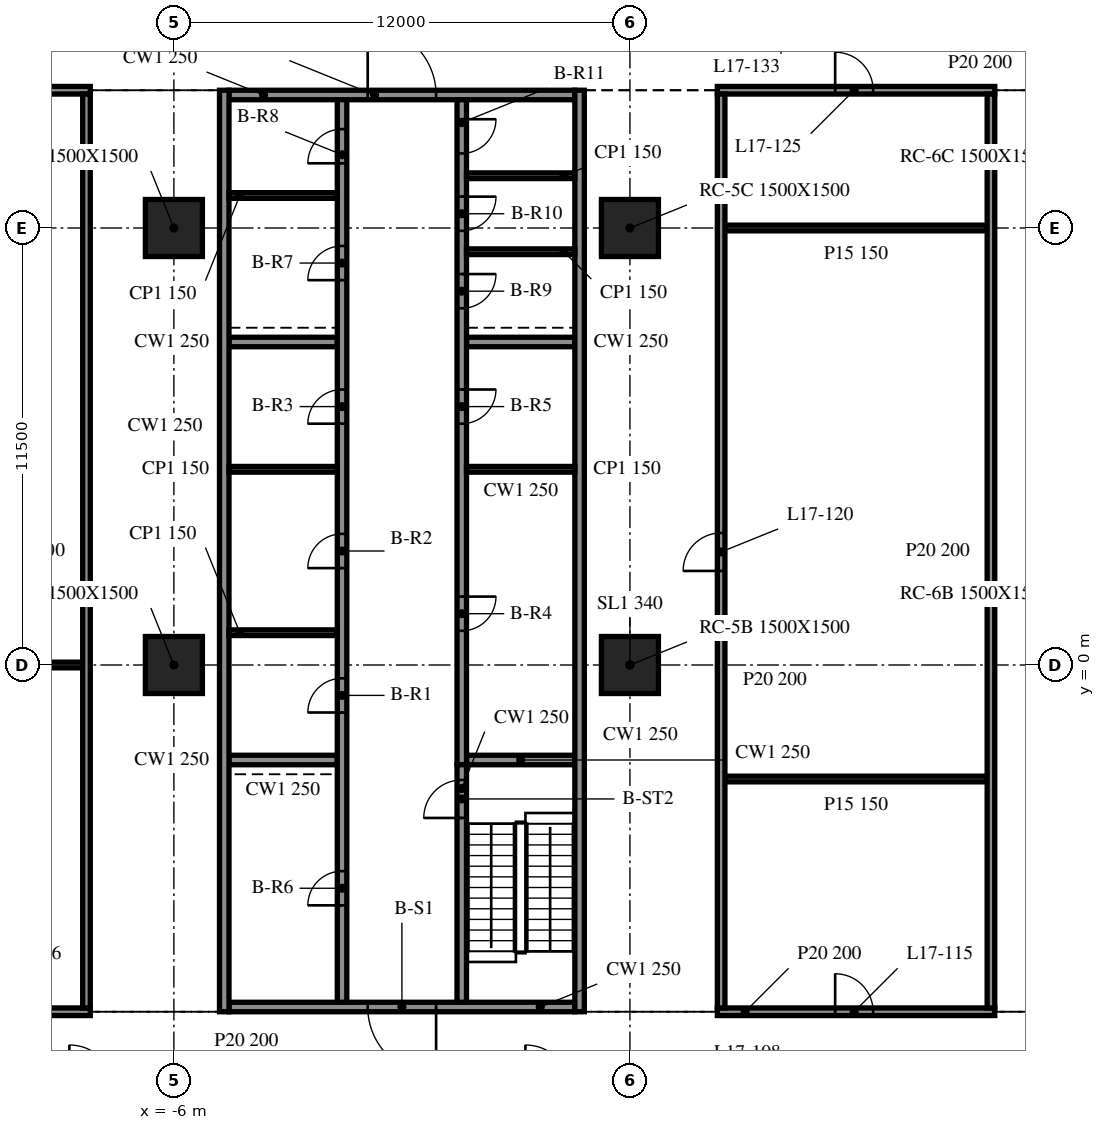
"""IFC4 building model, lengths in metres.
Left out: names, types, materials, properties, quantities, classifications, styles, units other than length and angle.
Written with IfcOpenShell. Run it as: python <this file> out.ifc"""

import sys

from ifc_helpers import new_model, si_unit, direction, frame, frame_2d, origin, origin_2d, place, context, subcontext, project, spatial, rectangle, extrude, element, fill, save


model = new_model("IFC4")
c1 = context("Model", 3, precision=1e-05, world=origin(), true_north=direction((0.0, 1.0)))
c2 = subcontext(c1, "Body", "Model", "MODEL_VIEW")
j1 = project(units=[si_unit("LENGTHUNIT", "METRE"), si_unit("PLANEANGLEUNIT", "RADIAN")], contexts=[c1])
p1 = place(None, origin())
s1 = spatial("IfcSite", under=j1, at=p1, CompositionType="ELEMENT")
p2 = place(p1, origin())
s2 = spatial("IfcBuilding", under=s1, at=p2, CompositionType="ELEMENT")
p3 = place(p2, frame((0.0, 0.0, 76.1)))
s3 = spatial("IfcBuildingStorey", under=s2, at=p3, CompositionType="ELEMENT", Elevation=76.1)
for number, where, z_axis, x_axis in (
    (1, (-6.0, 0.0, -0.34), (0.0, 0.0, 1.0), (1.0, 0.0, 0.0)),
    (2, (-6.0, 11.5, -0.34), (0.0, 0.0, 1.0), (1.0, 0.0, 0.0)),
    (3, (6.0, 0.0, -0.34), (0.0, 0.0, 1.0), (1.0, 0.0, 0.0)),
    (4, (6.0, 11.5, -0.34), (0.0, 0.0, 1.0), (1.0, 0.0, 0.0)),
):
    element("IfcColumn", number, at=place(p3, frame(where, z_axis=z_axis, x_axis=x_axis)), inside=s3, PredefinedType="COLUMN", context=c2, shape_type="SweptSolid", body=[
        extrude(rectangle(XDim=1.5, YDim=1.5, at=origin_2d()), origin(), (0.0, 0.0, 1.0), 4.09),
    ])
for number, where, z_axis, x_axis in (
    (5, (-4.675, 15.125, 0.0), (0.0, 0.0, 1.0), (0.0, -1.0, 0.0)),
    (6, (4.675, -9.125, 0.0), (0.0, 0.0, 1.0), (0.0, 1.0, 0.0)),
):
    element("IfcWall", number, at=place(p3, frame(where, z_axis=z_axis, x_axis=x_axis)), inside=s3, PredefinedType="SOLIDWALL", context=c2, shape_type="SweptSolid", body=[
        extrude(rectangle(XDim=24.25, YDim=0.25, at=frame_2d((12.125, 0.0))), origin(), (0.0, 0.0, 1.0), 3.75),
    ])
p4 = place(p3, frame((4.55, -9.0, 0.0), z_axis=(0.0, 0.0, 1.0), x_axis=(-1.0, 0.0, 0.0)))
e7 = element("IfcWall", 7, at=p4, inside=s3, PredefinedType="SOLIDWALL", context=c2, shape_type="SweptSolid", body=[
    extrude(rectangle(XDim=9.1, YDim=0.25, at=frame_2d((4.55, 0.0))), origin(), (0.0, 0.0, 1.0), 3.75),
])
p5 = place(p4, frame((3.65, 0.0, 0.0)))
e8 = element("IfcOpeningElement", 8, at=p5, cuts=e7, PredefinedType="OPENING", context=c2, shape_type="SweptSolid", body=[
    extrude(rectangle(XDim=1.8, YDim=2.1, at=frame_2d((0.9, 1.05))), frame((0.0, 0.135, 0.0), z_axis=(0.0, -1.0, 0.0), x_axis=(1.0, 0.0, 0.0)), (0.0, 0.0, 1.0), 0.27),
])
p6 = place(p3, frame((-4.55, 15.0, 0.0), z_axis=(0.0, 0.0, 1.0), x_axis=(1.0, 0.0, 0.0)))
e9 = element("IfcWall", 9, at=p6, inside=s3, PredefinedType="SOLIDWALL", context=c2, shape_type="SweptSolid", body=[
    extrude(rectangle(XDim=9.1, YDim=0.25, at=frame_2d((4.55, 0.0))), origin(), (0.0, 0.0, 1.0), 3.75),
])
p7 = place(p6, frame((3.65, 0.0, 0.0)))
e10 = element("IfcOpeningElement", 10, at=p7, cuts=e9, PredefinedType="OPENING", context=c2, shape_type="SweptSolid", body=[
    extrude(rectangle(XDim=1.8, YDim=2.1, at=frame_2d((0.9, 1.05))), frame((0.0, 0.135, 0.0), z_axis=(0.0, -1.0, 0.0), x_axis=(1.0, 0.0, 0.0)), (0.0, 0.0, 1.0), 0.27),
])
p8 = place(p3, frame((-1.575, -8.875, 0.0), z_axis=(0.0, 0.0, 1.0), x_axis=(0.0, 1.0, 0.0)))
e11 = element("IfcWall", 11, at=p8, inside=s3, PredefinedType="SOLIDWALL", context=c2, shape_type="SweptSolid", body=[
    extrude(rectangle(XDim=23.75, YDim=0.25, at=frame_2d((11.875, 0.0))), origin(), (0.0, 0.0, 1.0), 3.75),
])
p9 = place(p8, frame((7.625, 0.0, 0.0)))
e12 = element("IfcOpeningElement", 12, at=p9, cuts=e11, PredefinedType="OPENING", context=c2, shape_type="SweptSolid", body=[
    extrude(rectangle(XDim=0.9, YDim=2.1, at=frame_2d((0.45, 1.05))), frame((0.0, 0.135, 0.0), z_axis=(0.0, -1.0, 0.0), x_axis=(1.0, 0.0, 0.0)), (0.0, 0.0, 1.0), 0.27),
])
p10 = place(p8, frame((11.425, 0.0, 0.0)))
e13 = element("IfcOpeningElement", 13, at=p10, cuts=e11, PredefinedType="OPENING", context=c2, shape_type="SweptSolid", body=[
    extrude(rectangle(XDim=0.9, YDim=2.1, at=frame_2d((0.45, 1.05))), frame((0.0, 0.135, 0.0), z_axis=(0.0, -1.0, 0.0), x_axis=(1.0, 0.0, 0.0)), (0.0, 0.0, 1.0), 0.27),
])
p11 = place(p8, frame((15.225, 0.0, 0.0)))
e14 = element("IfcOpeningElement", 14, at=p11, cuts=e11, PredefinedType="OPENING", context=c2, shape_type="SweptSolid", body=[
    extrude(rectangle(XDim=0.9, YDim=2.1, at=frame_2d((0.45, 1.05))), frame((0.0, 0.135, 0.0), z_axis=(0.0, -1.0, 0.0), x_axis=(1.0, 0.0, 0.0)), (0.0, 0.0, 1.0), 0.27),
])
p12 = place(p8, frame((2.55, 0.0, 0.0)))
e15 = element("IfcOpeningElement", 15, at=p12, cuts=e11, PredefinedType="OPENING", context=c2, shape_type="SweptSolid", body=[
    extrude(rectangle(XDim=0.9, YDim=2.1, at=frame_2d((0.45, 1.05))), frame((0.0, 0.135, 0.0), z_axis=(0.0, -1.0, 0.0), x_axis=(1.0, 0.0, 0.0)), (0.0, 0.0, 1.0), 0.27),
])
p13 = place(p8, frame((19.002, 0.0, 0.0)))
e16 = element("IfcOpeningElement", 16, at=p13, cuts=e11, PredefinedType="OPENING", context=c2, shape_type="SweptSolid", body=[
    extrude(rectangle(XDim=0.9, YDim=2.1, at=frame_2d((0.45, 1.05))), frame((0.0, 0.135, 0.0), z_axis=(0.0, -1.0, 0.0), x_axis=(1.0, 0.0, 0.0)), (0.0, 0.0, 1.0), 0.27),
])
p14 = place(p8, frame((22.077, 0.0, 0.0)))
e17 = element("IfcOpeningElement", 17, at=p14, cuts=e11, PredefinedType="OPENING", context=c2, shape_type="SweptSolid", body=[
    extrude(rectangle(XDim=0.9, YDim=2.1, at=frame_2d((0.45, 1.05))), frame((0.0, 0.135, 0.0), z_axis=(0.0, -1.0, 0.0), x_axis=(1.0, 0.0, 0.0)), (0.0, 0.0, 1.0), 0.27),
])
p15 = place(p3, frame((1.575, -8.875, 0.0), z_axis=(0.0, 0.0, 1.0), x_axis=(0.0, 1.0, 0.0)))
e18 = element("IfcWall", 18, at=p15, inside=s3, PredefinedType="SOLIDWALL", context=c2, shape_type="SweptSolid", body=[
    extrude(rectangle(XDim=6.25, YDim=0.25, at=frame_2d((3.125, 0.0))), origin(), (0.0, 0.0, 1.0), 3.75),
])
p16 = place(p15, frame((4.85, 0.0, 0.0)))
e19 = element("IfcOpeningElement", 19, at=p16, cuts=e18, PredefinedType="OPENING", context=c2, shape_type="SweptSolid", body=[
    extrude(rectangle(XDim=1.0, YDim=2.1, at=frame_2d((0.5, 1.05))), frame((0.0, 0.135, 0.0), z_axis=(0.0, -1.0, 0.0), x_axis=(1.0, 0.0, 0.0)), (0.0, 0.0, 1.0), 0.27),
])
p17 = place(p3, frame((1.575, 14.875, 0.0), z_axis=(0.0, 0.0, 1.0), x_axis=(0.0, -1.0, 0.0)))
e20 = element("IfcWall", 20, at=p17, inside=s3, PredefinedType="SOLIDWALL", context=c2, shape_type="SweptSolid", body=[
    extrude(rectangle(XDim=17.5, YDim=0.25, at=frame_2d((8.75, 0.0))), origin(), (0.0, 0.0, 1.0), 3.75),
])
p18 = place(p17, frame((13.075, 0.0, 0.0)))
e21 = element("IfcOpeningElement", 21, at=p18, cuts=e20, PredefinedType="OPENING", context=c2, shape_type="SweptSolid", body=[
    extrude(rectangle(XDim=0.9, YDim=2.1, at=frame_2d((0.45, 1.05))), frame((0.0, 0.135, 0.0), z_axis=(0.0, -1.0, 0.0), x_axis=(1.0, 0.0, 0.0)), (0.0, 0.0, 1.0), 0.27),
])
p19 = place(p17, frame((7.625, 0.0, 0.0)))
e22 = element("IfcOpeningElement", 22, at=p19, cuts=e20, PredefinedType="OPENING", context=c2, shape_type="SweptSolid", body=[
    extrude(rectangle(XDim=0.9, YDim=2.1, at=frame_2d((0.45, 1.05))), frame((0.0, 0.135, 0.0), z_axis=(0.0, -1.0, 0.0), x_axis=(1.0, 0.0, 0.0)), (0.0, 0.0, 1.0), 0.27),
])
p20 = place(p17, frame((4.587, 0.0, 0.0)))
e23 = element("IfcOpeningElement", 23, at=p20, cuts=e20, PredefinedType="OPENING", context=c2, shape_type="SweptSolid", body=[
    extrude(rectangle(XDim=0.9, YDim=2.1, at=frame_2d((0.45, 1.05))), frame((0.0, 0.135, 0.0), z_axis=(0.0, -1.0, 0.0), x_axis=(1.0, 0.0, 0.0)), (0.0, 0.0, 1.0), 0.27),
])
p21 = place(p17, frame((2.55, 0.0, 0.0)))
e24 = element("IfcOpeningElement", 24, at=p21, cuts=e20, PredefinedType="OPENING", context=c2, shape_type="SweptSolid", body=[
    extrude(rectangle(XDim=0.9, YDim=2.1, at=frame_2d((0.45, 1.05))), frame((0.0, 0.135, 0.0), z_axis=(0.0, -1.0, 0.0), x_axis=(1.0, 0.0, 0.0)), (0.0, 0.0, 1.0), 0.27),
])
p22 = place(p17, frame((0.512, 0.0, 0.0)))
e25 = element("IfcOpeningElement", 25, at=p22, cuts=e20, PredefinedType="OPENING", context=c2, shape_type="SweptSolid", body=[
    extrude(rectangle(XDim=0.9, YDim=2.1, at=frame_2d((0.45, 1.05))), frame((0.0, 0.135, 0.0), z_axis=(0.0, -1.0, 0.0), x_axis=(1.0, 0.0, 0.0)), (0.0, 0.0, 1.0), 0.27),
])
for number, where, z_axis, x_axis in (
    (26, (-4.55, -2.5, 0.0), (0.0, 0.0, 1.0), (1.0, 0.0, 0.0)),
    (27, (-4.55, 8.5, 0.0), (0.0, 0.0, 1.0), (1.0, 0.0, 0.0)),
    (28, (1.7, -2.5, 0.0), (0.0, 0.0, 1.0), (1.0, 0.0, 0.0)),
    (29, (1.7, 8.5, 0.0), (0.0, 0.0, 1.0), (1.0, 0.0, 0.0)),
):
    element("IfcWall", number, at=place(p3, frame(where, z_axis=z_axis, x_axis=x_axis)), inside=s3, PredefinedType="SOLIDWALL", context=c2, shape_type="SweptSolid", body=[
        extrude(rectangle(XDim=2.85, YDim=0.25, at=frame_2d((1.425, 0.0))), origin(), (0.0, 0.0, 1.0), 3.75),
    ])
for number, where, z_axis, x_axis in (
    (30, (-4.55, 0.85, 0.0), (0.0, 0.0, 1.0), (1.0, 0.0, 0.0)),
    (31, (-4.55, 5.15, 0.0), (0.0, 0.0, 1.0), (1.0, 0.0, 0.0)),
    (32, (1.7, 5.15, 0.0), (0.0, 0.0, 1.0), (1.0, 0.0, 0.0)),
    (33, (-4.55, 12.355, 0.0), (0.0, 0.0, 1.0), (1.0, 0.0, 0.0)),
    (34, (1.7, 10.875, 0.0), (0.0, 0.0, 1.0), (1.0, 0.0, 0.0)),
    (35, (1.7, 12.875, 0.0), (0.0, 0.0, 1.0), (1.0, 0.0, 0.0)),
):
    element("IfcWall", number, at=place(p3, frame(where, z_axis=z_axis, x_axis=x_axis)), inside=s3, PredefinedType="PARTITIONING", context=c2, shape_type="SweptSolid", body=[
        extrude(rectangle(XDim=2.85, YDim=0.15, at=frame_2d((1.425, 0.0))), origin(), (0.0, 0.0, 1.0), 3.75),
    ])
p23 = place(p3, frame((-15.9, -9.125, 0.0), z_axis=(0.0, 0.0, 1.0), x_axis=(1.0, 0.0, 0.0)))
e36 = element("IfcWall", 36, at=p23, inside=s3, PredefinedType="PARTITIONING", context=c2, shape_type="SweptSolid", body=[
    extrude(rectangle(XDim=7.7, YDim=0.2, at=frame_2d((3.85, 0.0))), origin(), (0.0, 0.0, 1.0), 3.75),
])
p24 = place(p23, frame((3.3, 0.0, 0.0)))
e37 = element("IfcOpeningElement", 37, at=p24, cuts=e36, PredefinedType="OPENING", context=c2, shape_type="SweptSolid", body=[
    extrude(rectangle(XDim=1.0, YDim=2.1, at=frame_2d((0.5, 1.05))), frame((0.0, 0.11, 0.0), z_axis=(0.0, -1.0, 0.0), x_axis=(1.0, 0.0, 0.0)), (0.0, 0.0, 1.0), 0.22),
])
p25 = place(p3, frame((8.3, -9.125, 0.0), z_axis=(0.0, 0.0, 1.0), x_axis=(1.0, 0.0, 0.0)))
e38 = element("IfcWall", 38, at=p25, inside=s3, PredefinedType="PARTITIONING", context=c2, shape_type="SweptSolid", body=[
    extrude(rectangle(XDim=7.3, YDim=0.2, at=frame_2d((3.65, 0.0))), origin(), (0.0, 0.0, 1.0), 3.75),
])
p26 = place(p25, frame((3.1, 0.0, 0.0)))
e39 = element("IfcOpeningElement", 39, at=p26, cuts=e38, PredefinedType="OPENING", context=c2, shape_type="SweptSolid", body=[
    extrude(rectangle(XDim=1.0, YDim=2.1, at=frame_2d((0.5, 1.05))), frame((0.0, 0.11, 0.0), z_axis=(0.0, -1.0, 0.0), x_axis=(1.0, 0.0, 0.0)), (0.0, 0.0, 1.0), 0.22),
])
p27 = place(p3, frame((8.5, -3.0, 0.0), z_axis=(0.0, 0.0, 1.0), x_axis=(1.0, 0.0, 0.0)))
e40 = element("IfcWall", 40, at=p27, inside=s3, PredefinedType="PARTITIONING", context=c2, shape_type="SweptSolid", body=[
    extrude(rectangle(XDim=6.9, YDim=0.15, at=frame_2d((3.45, 0.0))), origin(), (0.0, 0.0, 1.0), 3.75),
])
p28 = place(p3, frame((-15.7, 0.0, 0.0), z_axis=(0.0, 0.0, 1.0), x_axis=(1.0, 0.0, 0.0)))
e41 = element("IfcWall", 41, at=p28, inside=s3, PredefinedType="PARTITIONING", context=c2, shape_type="SweptSolid", body=[
    extrude(rectangle(XDim=7.3, YDim=0.15, at=frame_2d((3.65, 0.0))), origin(), (0.0, 0.0, 1.0), 3.75),
])
p29 = place(p3, frame((8.5, 11.5, 0.0), z_axis=(0.0, 0.0, 1.0), x_axis=(1.0, 0.0, 0.0)))
e42 = element("IfcWall", 42, at=p29, inside=s3, PredefinedType="PARTITIONING", context=c2, shape_type="SweptSolid", body=[
    extrude(rectangle(XDim=6.9, YDim=0.15, at=frame_2d((3.45, 0.0))), origin(), (0.0, 0.0, 1.0), 3.75),
])
p30 = place(p3, frame((-15.9, 15.125, 0.0), z_axis=(0.0, 0.0, 1.0), x_axis=(1.0, 0.0, 0.0)))
e43 = element("IfcWall", 43, at=p30, inside=s3, PredefinedType="PARTITIONING", context=c2, shape_type="SweptSolid", body=[
    extrude(rectangle(XDim=7.7, YDim=0.2, at=frame_2d((3.85, 0.0))), origin(), (0.0, 0.0, 1.0), 3.75),
])
p31 = place(p3, frame((8.3, 15.125, 0.0), z_axis=(0.0, 0.0, 1.0), x_axis=(1.0, 0.0, 0.0)))
e44 = element("IfcWall", 44, at=p31, inside=s3, PredefinedType="PARTITIONING", context=c2, shape_type="SweptSolid", body=[
    extrude(rectangle(XDim=7.3, YDim=0.2, at=frame_2d((3.65, 0.0))), origin(), (0.0, 0.0, 1.0), 3.75),
])
p32 = place(p31, frame((3.1, 0.0, 0.0)))
e45 = element("IfcOpeningElement", 45, at=p32, cuts=e44, PredefinedType="OPENING", context=c2, shape_type="SweptSolid", body=[
    extrude(rectangle(XDim=1.0, YDim=2.1, at=frame_2d((0.5, 1.05))), frame((0.0, 0.11, 0.0), z_axis=(0.0, -1.0, 0.0), x_axis=(1.0, 0.0, 0.0)), (0.0, 0.0, 1.0), 0.22),
])
p33 = place(p3, frame((-8.3, -9.025, 0.0), z_axis=(0.0, 0.0, 1.0), x_axis=(0.0, 1.0, 0.0)))
e46 = element("IfcWall", 46, at=p33, inside=s3, PredefinedType="PARTITIONING", context=c2, shape_type="SweptSolid", body=[
    extrude(rectangle(XDim=24.05, YDim=0.2, at=frame_2d((12.025, 0.0))), origin(), (0.0, 0.0, 1.0), 3.75),
])
p34 = place(p3, frame((8.4, -9.025, 0.0), z_axis=(0.0, 0.0, 1.0), x_axis=(0.0, 1.0, 0.0)))
e47 = element("IfcWall", 47, at=p34, inside=s3, PredefinedType="PARTITIONING", context=c2, shape_type="SweptSolid", body=[
    extrude(rectangle(XDim=24.05, YDim=0.2, at=frame_2d((12.025, 0.0))), origin(), (0.0, 0.0, 1.0), 3.75),
])
p35 = place(p34, frame((11.5, 0.0, 0.0)))
e48 = element("IfcOpeningElement", 48, at=p35, cuts=e47, PredefinedType="OPENING", context=c2, shape_type="SweptSolid", body=[
    extrude(rectangle(XDim=1.0, YDim=2.1, at=frame_2d((0.5, 1.05))), frame((0.0, 0.11, 0.0), z_axis=(0.0, -1.0, 0.0), x_axis=(1.0, 0.0, 0.0)), (0.0, 0.0, 1.0), 0.22),
])
p36 = place(p3, frame((15.5, -9.025, 0.0), z_axis=(0.0, 0.0, 1.0), x_axis=(0.0, 1.0, 0.0)))
e49 = element("IfcWall", 49, at=p36, inside=s3, PredefinedType="PARTITIONING", context=c2, shape_type="SweptSolid", body=[
    extrude(rectangle(XDim=24.05, YDim=0.2, at=frame_2d((12.025, 0.0))), origin(), (0.0, 0.0, 1.0), 3.75),
])
p37 = place(p5, origin())
e50 = element("IfcDoor", 50, at=p37, inside=s3, OperationType="DOUBLE_DOOR_SINGLE_SWING", PredefinedType="DOOR", context=c2, shape_type="SweptSolid", body=[
    extrude(rectangle(XDim=1.8, YDim=2.1, at=frame_2d((0.9, 1.05))), frame((0.0, 0.025, 0.0), z_axis=(0.0, -1.0, 0.0), x_axis=(1.0, 0.0, 0.0)), (0.0, 0.0, 1.0), 0.05),
])
fill(e8, e50)
p38 = place(p7, origin())
e51 = element("IfcDoor", 51, at=p38, inside=s3, OperationType="DOUBLE_DOOR_SINGLE_SWING", PredefinedType="DOOR", context=c2, shape_type="SweptSolid", body=[
    extrude(rectangle(XDim=1.8, YDim=2.1, at=frame_2d((0.9, 1.05))), frame((0.0, 0.025, 0.0), z_axis=(0.0, -1.0, 0.0), x_axis=(1.0, 0.0, 0.0)), (0.0, 0.0, 1.0), 0.05),
])
fill(e10, e51)
p39 = place(p9, origin())
e52 = element("IfcDoor", 52, at=p39, inside=s3, OperationType="SINGLE_SWING_LEFT", PredefinedType="DOOR", context=c2, shape_type="SweptSolid", body=[
    extrude(rectangle(XDim=0.9, YDim=2.1, at=frame_2d((0.45, 1.05))), frame((0.0, 0.025, 0.0), z_axis=(0.0, -1.0, 0.0), x_axis=(1.0, 0.0, 0.0)), (0.0, 0.0, 1.0), 0.05),
])
fill(e12, e52)
p40 = place(p10, origin())
e53 = element("IfcDoor", 53, at=p40, inside=s3, OperationType="SINGLE_SWING_RIGHT", PredefinedType="DOOR", context=c2, shape_type="SweptSolid", body=[
    extrude(rectangle(XDim=0.9, YDim=2.1, at=frame_2d((0.45, 1.05))), frame((0.0, 0.025, 0.0), z_axis=(0.0, -1.0, 0.0), x_axis=(1.0, 0.0, 0.0)), (0.0, 0.0, 1.0), 0.05),
])
fill(e13, e53)
p41 = place(p11, origin())
e54 = element("IfcDoor", 54, at=p41, inside=s3, OperationType="SINGLE_SWING_LEFT", PredefinedType="DOOR", context=c2, shape_type="SweptSolid", body=[
    extrude(rectangle(XDim=0.9, YDim=2.1, at=frame_2d((0.45, 1.05))), frame((0.0, 0.025, 0.0), z_axis=(0.0, -1.0, 0.0), x_axis=(1.0, 0.0, 0.0)), (0.0, 0.0, 1.0), 0.05),
])
fill(e14, e54)
p42 = place(p18, origin())
e55 = element("IfcDoor", 55, at=p42, inside=s3, OperationType="SINGLE_SWING_RIGHT", PredefinedType="DOOR", context=c2, shape_type="SweptSolid", body=[
    extrude(rectangle(XDim=0.9, YDim=2.1, at=frame_2d((0.45, 1.05))), frame((0.0, 0.025, 0.0), z_axis=(0.0, -1.0, 0.0), x_axis=(1.0, 0.0, 0.0)), (0.0, 0.0, 1.0), 0.05),
])
fill(e21, e55)
p43 = place(p19, origin())
e56 = element("IfcDoor", 56, at=p43, inside=s3, OperationType="SINGLE_SWING_LEFT", PredefinedType="DOOR", context=c2, shape_type="SweptSolid", body=[
    extrude(rectangle(XDim=0.9, YDim=2.1, at=frame_2d((0.45, 1.05))), frame((0.0, 0.025, 0.0), z_axis=(0.0, -1.0, 0.0), x_axis=(1.0, 0.0, 0.0)), (0.0, 0.0, 1.0), 0.05),
])
fill(e22, e56)
p44 = place(p12, origin())
e57 = element("IfcDoor", 57, at=p44, inside=s3, OperationType="SINGLE_SWING_RIGHT", PredefinedType="DOOR", context=c2, shape_type="SweptSolid", body=[
    extrude(rectangle(XDim=0.9, YDim=2.1, at=frame_2d((0.45, 1.05))), frame((0.0, 0.025, 0.0), z_axis=(0.0, -1.0, 0.0), x_axis=(1.0, 0.0, 0.0)), (0.0, 0.0, 1.0), 0.05),
])
fill(e15, e57)
p45 = place(p13, origin())
e58 = element("IfcDoor", 58, at=p45, inside=s3, OperationType="SINGLE_SWING_LEFT", PredefinedType="DOOR", context=c2, shape_type="SweptSolid", body=[
    extrude(rectangle(XDim=0.9, YDim=2.1, at=frame_2d((0.45, 1.05))), frame((0.0, 0.025, 0.0), z_axis=(0.0, -1.0, 0.0), x_axis=(1.0, 0.0, 0.0)), (0.0, 0.0, 1.0), 0.05),
])
fill(e16, e58)
p46 = place(p14, origin())
e59 = element("IfcDoor", 59, at=p46, inside=s3, OperationType="SINGLE_SWING_RIGHT", PredefinedType="DOOR", context=c2, shape_type="SweptSolid", body=[
    extrude(rectangle(XDim=0.9, YDim=2.1, at=frame_2d((0.45, 1.05))), frame((0.0, 0.025, 0.0), z_axis=(0.0, -1.0, 0.0), x_axis=(1.0, 0.0, 0.0)), (0.0, 0.0, 1.0), 0.05),
])
fill(e17, e59)
p47 = place(p20, origin())
e60 = element("IfcDoor", 60, at=p47, inside=s3, OperationType="SINGLE_SWING_LEFT", PredefinedType="DOOR", context=c2, shape_type="SweptSolid", body=[
    extrude(rectangle(XDim=0.9, YDim=2.1, at=frame_2d((0.45, 1.05))), frame((0.0, 0.025, 0.0), z_axis=(0.0, -1.0, 0.0), x_axis=(1.0, 0.0, 0.0)), (0.0, 0.0, 1.0), 0.05),
])
fill(e23, e60)
p48 = place(p21, origin())
e61 = element("IfcDoor", 61, at=p48, inside=s3, OperationType="SINGLE_SWING_RIGHT", PredefinedType="DOOR", context=c2, shape_type="SweptSolid", body=[
    extrude(rectangle(XDim=0.9, YDim=2.1, at=frame_2d((0.45, 1.05))), frame((0.0, 0.025, 0.0), z_axis=(0.0, -1.0, 0.0), x_axis=(1.0, 0.0, 0.0)), (0.0, 0.0, 1.0), 0.05),
])
fill(e24, e61)
p49 = place(p22, origin())
e62 = element("IfcDoor", 62, at=p49, inside=s3, OperationType="SINGLE_SWING_LEFT", PredefinedType="DOOR", context=c2, shape_type="SweptSolid", body=[
    extrude(rectangle(XDim=0.9, YDim=2.1, at=frame_2d((0.45, 1.05))), frame((0.0, 0.025, 0.0), z_axis=(0.0, -1.0, 0.0), x_axis=(1.0, 0.0, 0.0)), (0.0, 0.0, 1.0), 0.05),
])
fill(e25, e62)
p50 = place(p16, origin())
e63 = element("IfcDoor", 63, at=p50, inside=s3, OperationType="SINGLE_SWING_RIGHT", PredefinedType="DOOR", context=c2, shape_type="SweptSolid", body=[
    extrude(rectangle(XDim=1.0, YDim=2.1, at=frame_2d((0.5, 1.05))), frame((0.0, 0.025, 0.0), z_axis=(0.0, -1.0, 0.0), x_axis=(1.0, 0.0, 0.0)), (0.0, 0.0, 1.0), 0.05),
])
fill(e19, e63)
p51 = place(p26, origin())
e64 = element("IfcDoor", 64, at=p51, inside=s3, OperationType="SINGLE_SWING_LEFT", PredefinedType="DOOR", context=c2, shape_type="SweptSolid", body=[
    extrude(rectangle(XDim=1.0, YDim=2.1, at=frame_2d((0.5, 1.05))), frame((0.0, 0.025, 0.0), z_axis=(0.0, -1.0, 0.0), x_axis=(1.0, 0.0, 0.0)), (0.0, 0.0, 1.0), 0.05),
])
fill(e39, e64)
p52 = place(p35, origin())
e65 = element("IfcDoor", 65, at=p52, inside=s3, OperationType="SINGLE_SWING_RIGHT", PredefinedType="DOOR", context=c2, shape_type="SweptSolid", body=[
    extrude(rectangle(XDim=1.0, YDim=2.1, at=frame_2d((0.5, 1.05))), frame((0.0, 0.025, 0.0), z_axis=(0.0, -1.0, 0.0), x_axis=(1.0, 0.0, 0.0)), (0.0, 0.0, 1.0), 0.05),
])
fill(e48, e65)
p53 = place(p32, origin())
e66 = element("IfcDoor", 66, at=p53, inside=s3, OperationType="SINGLE_SWING_RIGHT", PredefinedType="DOOR", context=c2, shape_type="SweptSolid", body=[
    extrude(rectangle(XDim=1.0, YDim=2.1, at=frame_2d((0.5, 1.05))), frame((0.0, 0.025, 0.0), z_axis=(0.0, -1.0, 0.0), x_axis=(1.0, 0.0, 0.0)), (0.0, 0.0, 1.0), 0.05),
])
fill(e45, e66)
save(model, sys.argv[1])
